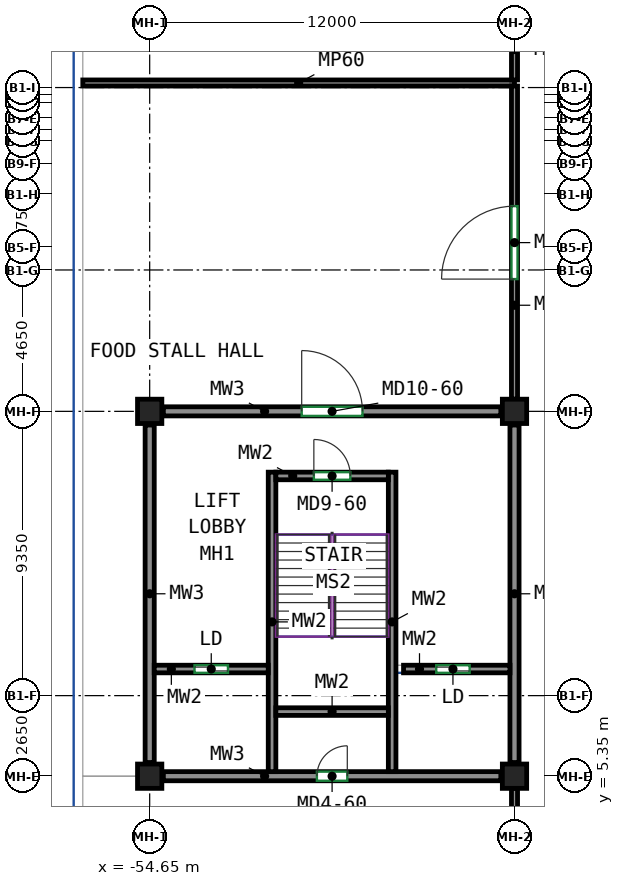
"""IFC4 building model, lengths in metres.
Left out: names, types, materials, properties, quantities, classifications, styles, units other than length and angle.
Written with IfcOpenShell. Run it as: python <this file> out.ifc"""

import sys

from ifc_helpers import new_model, si_unit, direction, frame, frame_2d, origin, origin_2d, place, context, subcontext, project, spatial, rectangle, extrude, source, transform, mapped, element, fill, save


model = new_model("IFC4")
c1 = context("Model", 3, precision=1e-05, world=origin(), true_north=direction((0.0, 1.0)))
c2 = subcontext(c1, "Body", "Model", "MODEL_VIEW")
j1 = project(units=[si_unit("LENGTHUNIT", "METRE"), si_unit("PLANEANGLEUNIT", "RADIAN")], contexts=[c1])
p1 = place(None, origin())
s1 = spatial("IfcSite", under=j1, at=p1, CompositionType="ELEMENT")
p2 = place(p1, origin())
s2 = spatial("IfcBuilding", under=s1, at=p2, CompositionType="ELEMENT")
p3 = place(p2, frame((0.0, 0.0, 9.0)))
s3 = spatial("IfcBuildingStorey", under=s2, at=p3, CompositionType="ELEMENT", Elevation=9.0)
m1 = source(origin(), c2, "Body", "SweptSolid", [
    extrude(rectangle(XDim=0.8, YDim=0.8, at=origin_2d()), origin(), (0.0, 0.0, 1.0), 4.1),
])
for number, where, z_axis, x_axis in (
    (1, (-54.65, 5.35, 0.0), (0.0, 0.0, 1.0), (1.0, 0.0, 0.0)),
    (2, (-54.65, 17.35, 0.0), (0.0, 0.0, 1.0), (1.0, 0.0, 0.0)),
    (3, (-42.65, 5.35, 0.0), (0.0, 0.0, 1.0), (1.0, 0.0, 0.0)),
    (4, (-42.65, 17.35, 0.0), (0.0, 0.0, 1.0), (1.0, 0.0, 0.0)),
):
    element("IfcColumn", number, at=place(p3, frame(where, z_axis=z_axis, x_axis=x_axis)), inside=s3, PredefinedType="COLUMN", context=c2, shape_type="MappedRepresentation", body=[
        mapped(m1, transform((0.0, 0.0, 0.0))),
    ])
m2 = source(origin(), c2, "Body", "SweptSolid", [
    extrude(rectangle(XDim=11.1, YDim=0.3, at=frame_2d((5.55, 0.0))), origin(), (0.0, 0.0, 1.0), 3.2),
])
p4 = place(p3, frame((-54.2, 5.35, 0.0), z_axis=(0.0, 0.0, 1.0), x_axis=(1.0, 0.0, 0.0)))
e5 = element("IfcWall", 5, at=p4, inside=s3, PredefinedType="SHEAR", context=c2, shape_type="MappedRepresentation", body=[
    mapped(m2, transform((0.0, 0.0, 0.0))),
])
p5 = place(p4, frame((5.05, 0.0, 0.0)))
e6 = element("IfcOpeningElement", 6, at=p5, cuts=e5, PredefinedType="OPENING", context=c2, shape_type="SweptSolid", body=[
    extrude(rectangle(XDim=1.0, YDim=2.1, at=frame_2d((0.5, 1.05))), frame((0.0, 0.16, 0.0), z_axis=(0.0, -1.0, 0.0), x_axis=(1.0, 0.0, 0.0)), (0.0, 0.0, 1.0), 0.32),
])
p6 = place(p3, frame((-54.2, 17.35, 0.0), z_axis=(0.0, 0.0, 1.0), x_axis=(1.0, 0.0, 0.0)))
e7 = element("IfcWall", 7, at=p6, inside=s3, PredefinedType="SHEAR", context=c2, shape_type="MappedRepresentation", body=[
    mapped(m2, transform((0.0, 0.0, 0.0))),
])
p7 = place(p6, frame((4.55, 0.0, 0.0)))
e8 = element("IfcOpeningElement", 8, at=p7, cuts=e7, PredefinedType="OPENING", context=c2, shape_type="SweptSolid", body=[
    extrude(rectangle(XDim=2.0, YDim=2.4, at=frame_2d((1.0, 1.2))), frame((0.0, 0.16, 0.0), z_axis=(0.0, -1.0, 0.0), x_axis=(1.0, 0.0, 0.0)), (0.0, 0.0, 1.0), 0.32),
])
for number, where, z_axis, x_axis in (
    (9, (-54.65, 5.8, 0.0), (0.0, 0.0, 1.0), (0.0, 1.0, 0.0)),
    (10, (-42.65, 5.8, 0.0), (0.0, 0.0, 1.0), (0.0, 1.0, 0.0)),
):
    element("IfcWall", number, at=place(p3, frame(where, z_axis=z_axis, x_axis=x_axis)), inside=s3, PredefinedType="SHEAR", context=c2, shape_type="MappedRepresentation", body=[
        mapped(m2, transform((0.0, 0.0, 0.0))),
    ])
m3 = source(origin(), c2, "Body", "SweptSolid", [
    extrude(rectangle(XDim=9.85, YDim=0.25, at=frame_2d((4.925, 0.0))), origin(), (0.0, 0.0, 1.0), 4.1),
])
for number, where, z_axis, x_axis in (
    (11, (-50.625, 5.5, 0.0), (0.0, 0.0, 1.0), (0.0, 1.0, 0.0)),
    (12, (-46.675, 5.5, 0.0), (0.0, 0.0, 1.0), (0.0, 1.0, 0.0)),
):
    element("IfcWall", number, at=place(p3, frame(where, z_axis=z_axis, x_axis=x_axis)), inside=s3, PredefinedType="SHEAR", context=c2, shape_type="MappedRepresentation", body=[
        mapped(m3, transform((0.0, 0.0, 0.0))),
    ])
m4 = source(origin(), c2, "Body", "SweptSolid", [
    extrude(rectangle(XDim=3.7, YDim=0.25, at=frame_2d((1.85, 0.0))), origin(), (0.0, 0.0, 1.0), 4.1),
])
p8 = place(p3, frame((-50.5, 7.475, 0.0), z_axis=(0.0, 0.0, 1.0), x_axis=(1.0, 0.0, 0.0)))
e13 = element("IfcWall", 13, at=p8, inside=s3, PredefinedType="SHEAR", context=c2, shape_type="MappedRepresentation", body=[
    mapped(m4, transform((0.0, 0.0, 0.0))),
])
p9 = place(p3, frame((-50.5, 15.225, 0.0), z_axis=(0.0, 0.0, 1.0), x_axis=(1.0, 0.0, 0.0)))
e14 = element("IfcWall", 14, at=p9, inside=s3, PredefinedType="SHEAR", context=c2, shape_type="MappedRepresentation", body=[
    mapped(m4, transform((0.0, 0.0, 0.0))),
])
p10 = place(p9, frame((1.25, 0.0, 0.0)))
e15 = element("IfcOpeningElement", 15, at=p10, cuts=e14, PredefinedType="OPENING", context=c2, shape_type="SweptSolid", body=[
    extrude(rectangle(XDim=1.2, YDim=2.1, at=frame_2d((0.6, 1.05))), frame((0.0, 0.135, 0.0), z_axis=(0.0, -1.0, 0.0), x_axis=(1.0, 0.0, 0.0)), (0.0, 0.0, 1.0), 0.27),
])
m5 = source(origin(), c2, "Body", "SweptSolid", [
    extrude(rectangle(XDim=3.75, YDim=0.25, at=frame_2d((1.875, 0.0))), origin(), (0.0, 0.0, 1.0), 4.1),
])
p11 = place(p3, frame((-54.5, 8.875, 0.0), z_axis=(0.0, 0.0, 1.0), x_axis=(1.0, 0.0, 0.0)))
e16 = element("IfcWall", 16, at=p11, inside=s3, PredefinedType="SHEAR", context=c2, shape_type="MappedRepresentation", body=[
    mapped(m5, transform((0.0, 0.0, 0.0))),
])
p12 = place(p11, frame((1.325, 0.0, 0.0)))
e17 = element("IfcOpeningElement", 17, at=p12, cuts=e16, PredefinedType="OPENING", context=c2, shape_type="SweptSolid", body=[
    extrude(rectangle(XDim=1.1, YDim=2.1, at=frame_2d((0.55, 1.05))), frame((0.0, 0.135, 0.0), z_axis=(0.0, -1.0, 0.0), x_axis=(1.0, 0.0, 0.0)), (0.0, 0.0, 1.0), 0.27),
])
m6 = source(origin(), c2, "Body", "SweptSolid", [
    extrude(rectangle(XDim=3.5, YDim=0.25, at=frame_2d((1.75, 0.0))), origin(), (0.0, 0.0, 1.0), 4.1),
])
p13 = place(p3, frame((-46.3, 8.875, 0.0), z_axis=(0.0, 0.0, 1.0), x_axis=(1.0, 0.0, 0.0)))
e18 = element("IfcWall", 18, at=p13, inside=s3, PredefinedType="SHEAR", context=c2, shape_type="MappedRepresentation", body=[
    mapped(m6, transform((0.0, 0.0, 0.0))),
])
p14 = place(p13, frame((1.075, 0.0, 0.0)))
e19 = element("IfcOpeningElement", 19, at=p14, cuts=e18, PredefinedType="OPENING", context=c2, shape_type="SweptSolid", body=[
    extrude(rectangle(XDim=1.1, YDim=2.1, at=frame_2d((0.55, 1.05))), frame((0.0, 0.135, 0.0), z_axis=(0.0, -1.0, 0.0), x_axis=(1.0, 0.0, 0.0)), (0.0, 0.0, 1.0), 0.27),
])
m7 = source(origin(), c2, "Body", "SweptSolid", [
    extrude(rectangle(XDim=100.7, YDim=0.3, at=frame_2d((50.35, 0.0))), origin(), (0.0, 0.0, 1.0), 4.1),
])
p15 = place(p3, frame((-57.0, -43.55, 0.0), z_axis=(0.0, 0.0, 1.0), x_axis=(0.0, 1.0, 0.0)))
e20 = element("IfcWall", 20, at=p15, inside=s3, PredefinedType="SOLIDWALL", context=c2, shape_type="MappedRepresentation", body=[
    mapped(m7, transform((0.0, 0.0, 0.0))),
])
p16 = place(p15, frame((3.15, 0.0, 0.9)))
e21 = element("IfcOpeningElement", 21, at=p16, cuts=e20, PredefinedType="OPENING", context=c2, shape_type="SweptSolid", body=[
    extrude(rectangle(XDim=2.4, YDim=1.8, at=frame_2d((1.2, 0.9))), frame((0.0, 0.16, 0.0), z_axis=(0.0, -1.0, 0.0), x_axis=(1.0, 0.0, 0.0)), (0.0, 0.0, 1.0), 0.32),
])
p17 = place(p15, frame((7.15, 0.0, 0.9)))
e22 = element("IfcOpeningElement", 22, at=p17, cuts=e20, PredefinedType="OPENING", context=c2, shape_type="SweptSolid", body=[
    extrude(rectangle(XDim=2.4, YDim=1.8, at=frame_2d((1.2, 0.9))), frame((0.0, 0.16, 0.0), z_axis=(0.0, -1.0, 0.0), x_axis=(1.0, 0.0, 0.0)), (0.0, 0.0, 1.0), 0.32),
])
p18 = place(p15, frame((11.15, 0.0, 0.9)))
e23 = element("IfcOpeningElement", 23, at=p18, cuts=e20, PredefinedType="OPENING", context=c2, shape_type="SweptSolid", body=[
    extrude(rectangle(XDim=2.4, YDim=1.8, at=frame_2d((1.2, 0.9))), frame((0.0, 0.16, 0.0), z_axis=(0.0, -1.0, 0.0), x_axis=(1.0, 0.0, 0.0)), (0.0, 0.0, 1.0), 0.32),
])
p19 = place(p15, frame((19.15, 0.0, 0.9)))
e24 = element("IfcOpeningElement", 24, at=p19, cuts=e20, PredefinedType="OPENING", context=c2, shape_type="SweptSolid", body=[
    extrude(rectangle(XDim=2.4, YDim=1.8, at=frame_2d((1.2, 0.9))), frame((0.0, 0.16, 0.0), z_axis=(0.0, -1.0, 0.0), x_axis=(1.0, 0.0, 0.0)), (0.0, 0.0, 1.0), 0.32),
])
p20 = place(p15, frame((23.15, 0.0, 0.9)))
e25 = element("IfcOpeningElement", 25, at=p20, cuts=e20, PredefinedType="OPENING", context=c2, shape_type="SweptSolid", body=[
    extrude(rectangle(XDim=2.4, YDim=1.8, at=frame_2d((1.2, 0.9))), frame((0.0, 0.16, 0.0), z_axis=(0.0, -1.0, 0.0), x_axis=(1.0, 0.0, 0.0)), (0.0, 0.0, 1.0), 0.32),
])
p21 = place(p15, frame((27.15, 0.0, 0.9)))
e26 = element("IfcOpeningElement", 26, at=p21, cuts=e20, PredefinedType="OPENING", context=c2, shape_type="SweptSolid", body=[
    extrude(rectangle(XDim=2.4, YDim=1.8, at=frame_2d((1.2, 0.9))), frame((0.0, 0.16, 0.0), z_axis=(0.0, -1.0, 0.0), x_axis=(1.0, 0.0, 0.0)), (0.0, 0.0, 1.0), 0.32),
])
p22 = place(p15, frame((31.15, 0.0, 0.9)))
e27 = element("IfcOpeningElement", 27, at=p22, cuts=e20, PredefinedType="OPENING", context=c2, shape_type="SweptSolid", body=[
    extrude(rectangle(XDim=2.4, YDim=1.8, at=frame_2d((1.2, 0.9))), frame((0.0, 0.16, 0.0), z_axis=(0.0, -1.0, 0.0), x_axis=(1.0, 0.0, 0.0)), (0.0, 0.0, 1.0), 0.32),
])
p23 = place(p15, frame((39.15, 0.0, 0.9)))
e28 = element("IfcOpeningElement", 28, at=p23, cuts=e20, PredefinedType="OPENING", context=c2, shape_type="SweptSolid", body=[
    extrude(rectangle(XDim=2.4, YDim=1.8, at=frame_2d((1.2, 0.9))), frame((0.0, 0.16, 0.0), z_axis=(0.0, -1.0, 0.0), x_axis=(1.0, 0.0, 0.0)), (0.0, 0.0, 1.0), 0.32),
])
p24 = place(p15, frame((43.15, 0.0, 0.9)))
e29 = element("IfcOpeningElement", 29, at=p24, cuts=e20, PredefinedType="OPENING", context=c2, shape_type="SweptSolid", body=[
    extrude(rectangle(XDim=2.4, YDim=1.8, at=frame_2d((1.2, 0.9))), frame((0.0, 0.16, 0.0), z_axis=(0.0, -1.0, 0.0), x_axis=(1.0, 0.0, 0.0)), (0.0, 0.0, 1.0), 0.32),
])
p25 = place(p15, frame((51.15, 0.0, 0.9)))
e30 = element("IfcOpeningElement", 30, at=p25, cuts=e20, PredefinedType="OPENING", context=c2, shape_type="SweptSolid", body=[
    extrude(rectangle(XDim=2.4, YDim=1.8, at=frame_2d((1.2, 0.9))), frame((0.0, 0.16, 0.0), z_axis=(0.0, -1.0, 0.0), x_axis=(1.0, 0.0, 0.0)), (0.0, 0.0, 1.0), 0.32),
])
p26 = place(p15, frame((55.15, 0.0, 0.9)))
e31 = element("IfcOpeningElement", 31, at=p26, cuts=e20, PredefinedType="OPENING", context=c2, shape_type="SweptSolid", body=[
    extrude(rectangle(XDim=2.4, YDim=1.8, at=frame_2d((1.2, 0.9))), frame((0.0, 0.16, 0.0), z_axis=(0.0, -1.0, 0.0), x_axis=(1.0, 0.0, 0.0)), (0.0, 0.0, 1.0), 0.32),
])
p27 = place(p15, frame((59.15, 0.0, 0.9)))
e32 = element("IfcOpeningElement", 32, at=p27, cuts=e20, PredefinedType="OPENING", context=c2, shape_type="SweptSolid", body=[
    extrude(rectangle(XDim=2.4, YDim=1.8, at=frame_2d((1.2, 0.9))), frame((0.0, 0.16, 0.0), z_axis=(0.0, -1.0, 0.0), x_axis=(1.0, 0.0, 0.0)), (0.0, 0.0, 1.0), 0.32),
])
p28 = place(p15, frame((63.15, 0.0, 0.9)))
e33 = element("IfcOpeningElement", 33, at=p28, cuts=e20, PredefinedType="OPENING", context=c2, shape_type="SweptSolid", body=[
    extrude(rectangle(XDim=2.4, YDim=1.8, at=frame_2d((1.2, 0.9))), frame((0.0, 0.16, 0.0), z_axis=(0.0, -1.0, 0.0), x_axis=(1.0, 0.0, 0.0)), (0.0, 0.0, 1.0), 0.32),
])
p29 = place(p15, frame((67.15, 0.0, 0.9)))
e34 = element("IfcOpeningElement", 34, at=p29, cuts=e20, PredefinedType="OPENING", context=c2, shape_type="SweptSolid", body=[
    extrude(rectangle(XDim=2.4, YDim=1.8, at=frame_2d((1.2, 0.9))), frame((0.0, 0.16, 0.0), z_axis=(0.0, -1.0, 0.0), x_axis=(1.0, 0.0, 0.0)), (0.0, 0.0, 1.0), 0.32),
])
p30 = place(p15, frame((75.15, 0.0, 0.9)))
e35 = element("IfcOpeningElement", 35, at=p30, cuts=e20, PredefinedType="OPENING", context=c2, shape_type="SweptSolid", body=[
    extrude(rectangle(XDim=2.4, YDim=1.8, at=frame_2d((1.2, 0.9))), frame((0.0, 0.16, 0.0), z_axis=(0.0, -1.0, 0.0), x_axis=(1.0, 0.0, 0.0)), (0.0, 0.0, 1.0), 0.32),
])
p31 = place(p15, frame((79.15, 0.0, 0.9)))
e36 = element("IfcOpeningElement", 36, at=p31, cuts=e20, PredefinedType="OPENING", context=c2, shape_type="SweptSolid", body=[
    extrude(rectangle(XDim=2.4, YDim=1.8, at=frame_2d((1.2, 0.9))), frame((0.0, 0.16, 0.0), z_axis=(0.0, -1.0, 0.0), x_axis=(1.0, 0.0, 0.0)), (0.0, 0.0, 1.0), 0.32),
])
p32 = place(p15, frame((83.15, 0.0, 0.9)))
e37 = element("IfcOpeningElement", 37, at=p32, cuts=e20, PredefinedType="OPENING", context=c2, shape_type="SweptSolid", body=[
    extrude(rectangle(XDim=2.4, YDim=1.8, at=frame_2d((1.2, 0.9))), frame((0.0, 0.16, 0.0), z_axis=(0.0, -1.0, 0.0), x_axis=(1.0, 0.0, 0.0)), (0.0, 0.0, 1.0), 0.32),
])
p33 = place(p15, frame((87.15, 0.0, 0.9)))
e38 = element("IfcOpeningElement", 38, at=p33, cuts=e20, PredefinedType="OPENING", context=c2, shape_type="SweptSolid", body=[
    extrude(rectangle(XDim=2.4, YDim=1.8, at=frame_2d((1.2, 0.9))), frame((0.0, 0.16, 0.0), z_axis=(0.0, -1.0, 0.0), x_axis=(1.0, 0.0, 0.0)), (0.0, 0.0, 1.0), 0.32),
])
p34 = place(p15, frame((91.15, 0.0, 0.9)))
e39 = element("IfcOpeningElement", 39, at=p34, cuts=e20, PredefinedType="OPENING", context=c2, shape_type="SweptSolid", body=[
    extrude(rectangle(XDim=2.4, YDim=1.8, at=frame_2d((1.2, 0.9))), frame((0.0, 0.16, 0.0), z_axis=(0.0, -1.0, 0.0), x_axis=(1.0, 0.0, 0.0)), (0.0, 0.0, 1.0), 0.32),
])
p35 = place(p15, frame((95.15, 0.0, 0.9)))
e40 = element("IfcOpeningElement", 40, at=p35, cuts=e20, PredefinedType="OPENING", context=c2, shape_type="SweptSolid", body=[
    extrude(rectangle(XDim=2.4, YDim=1.8, at=frame_2d((1.2, 0.9))), frame((0.0, 0.16, 0.0), z_axis=(0.0, -1.0, 0.0), x_axis=(1.0, 0.0, 0.0)), (0.0, 0.0, 1.0), 0.32),
])
m8 = source(origin(), c2, "Body", "SweptSolid", [
    extrude(rectangle(XDim=1.8, YDim=0.2, at=frame_2d((0.9, 0.0))), origin(), (0.0, 0.0, 1.0), 4.1),
])
p36 = place(p3, frame((-56.85, 5.35, 0.0), z_axis=(0.0, 0.0, 1.0), x_axis=(1.0, 0.0, 0.0)))
e41 = element("IfcWall", 41, at=p36, inside=s3, PredefinedType="PARTITIONING", context=c2, shape_type="MappedRepresentation", body=[
    mapped(m8, transform((0.0, 0.0, 0.0))),
])
m9 = source(origin(), c2, "Body", "SweptSolid", [
    extrude(rectangle(XDim=14.2, YDim=0.2, at=frame_2d((7.1, 0.0))), origin(), (0.0, 0.0, 1.0), 3.2),
])
p37 = place(p3, frame((-56.85, 28.15, 0.0), z_axis=(0.0, 0.0, 1.0), x_axis=(1.0, 0.0, 0.0)))
e42 = element("IfcWall", 42, at=p37, inside=s3, PredefinedType="PARTITIONING", context=c2, shape_type="MappedRepresentation", body=[
    mapped(m9, transform((0.0, 0.0, 0.0))),
])
m10 = source(origin(), c2, "Body", "SweptSolid", [
    extrude(rectangle(XDim=11.2, YDim=0.2, at=frame_2d((5.6, 0.0))), origin(), (0.0, 0.0, 1.0), 3.2),
])
p38 = place(p3, frame((-42.65, -6.25, 0.0), z_axis=(0.0, 0.0, 1.0), x_axis=(0.0, 1.0, 0.0)))
e43 = element("IfcWall", 43, at=p38, inside=s3, PredefinedType="PARTITIONING", context=c2, shape_type="MappedRepresentation", body=[
    mapped(m10, transform((0.0, 0.0, 0.0))),
])
p39 = place(p38, frame((5.0, 0.0, 0.0)))
e44 = element("IfcOpeningElement", 44, at=p39, cuts=e43, PredefinedType="OPENING", context=c2, shape_type="SweptSolid", body=[
    extrude(rectangle(XDim=1.2, YDim=2.1, at=frame_2d((0.6, 1.05))), frame((0.0, 0.11, 0.0), z_axis=(0.0, -1.0, 0.0), x_axis=(1.0, 0.0, 0.0)), (0.0, 0.0, 1.0), 0.22),
])
m11 = source(origin(), c2, "Body", "SweptSolid", [
    extrude(rectangle(XDim=10.3, YDim=0.2, at=frame_2d((5.15, 0.0))), origin(), (0.0, 0.0, 1.0), 3.2),
])
p40 = place(p3, frame((-42.65, 17.75, 0.0), z_axis=(0.0, 0.0, 1.0), x_axis=(0.0, 1.0, 0.0)))
e45 = element("IfcWall", 45, at=p40, inside=s3, PredefinedType="PARTITIONING", context=c2, shape_type="MappedRepresentation", body=[
    mapped(m11, transform((0.0, 0.0, 0.0))),
])
p41 = place(p40, frame((3.95, 0.0, 0.0)))
e46 = element("IfcOpeningElement", 46, at=p41, cuts=e45, PredefinedType="OPENING", context=c2, shape_type="SweptSolid", body=[
    extrude(rectangle(XDim=2.4, YDim=2.4, at=frame_2d((1.2, 1.2))), frame((0.0, 0.11, 0.0), z_axis=(0.0, -1.0, 0.0), x_axis=(1.0, 0.0, 0.0)), (0.0, 0.0, 1.0), 0.22),
])
m12 = source(origin(), c2, "Body", "SweptSolid", [
    extrude(rectangle(XDim=2.0, YDim=0.2, at=frame_2d((1.0, 0.0))), origin(), (0.0, 0.0, 1.0), 3.2),
])
p42 = place(p3, frame((-42.65, 28.25, 0.0), z_axis=(0.0, 0.0, 1.0), x_axis=(0.0, 1.0, 0.0)))
e47 = element("IfcWall", 47, at=p42, inside=s3, PredefinedType="PARTITIONING", context=c2, shape_type="MappedRepresentation", body=[
    mapped(m12, transform((0.0, 0.0, 0.0))),
])
p43 = place(p25, origin())
e48 = element("IfcWindow", 48, at=p43, inside=s3, PartitioningType="SINGLE_PANEL", PredefinedType="WINDOW", context=c2, shape_type="SweptSolid", body=[
    extrude(rectangle(XDim=2.4, YDim=1.8, at=frame_2d((1.2, 0.9))), frame((0.0, 0.03, 0.0), z_axis=(0.0, -1.0, 0.0), x_axis=(1.0, 0.0, 0.0)), (0.0, 0.0, 1.0), 0.06),
])
fill(e30, e48)
p44 = place(p26, origin())
e49 = element("IfcWindow", 49, at=p44, inside=s3, PartitioningType="SINGLE_PANEL", PredefinedType="WINDOW", context=c2, shape_type="SweptSolid", body=[
    extrude(rectangle(XDim=2.4, YDim=1.8, at=frame_2d((1.2, 0.9))), frame((0.0, 0.03, 0.0), z_axis=(0.0, -1.0, 0.0), x_axis=(1.0, 0.0, 0.0)), (0.0, 0.0, 1.0), 0.06),
])
fill(e31, e49)
p45 = place(p27, origin())
e50 = element("IfcWindow", 50, at=p45, inside=s3, PartitioningType="SINGLE_PANEL", PredefinedType="WINDOW", context=c2, shape_type="SweptSolid", body=[
    extrude(rectangle(XDim=2.4, YDim=1.8, at=frame_2d((1.2, 0.9))), frame((0.0, 0.03, 0.0), z_axis=(0.0, -1.0, 0.0), x_axis=(1.0, 0.0, 0.0)), (0.0, 0.0, 1.0), 0.06),
])
fill(e32, e50)
p46 = place(p28, origin())
e51 = element("IfcWindow", 51, at=p46, inside=s3, PartitioningType="SINGLE_PANEL", PredefinedType="WINDOW", context=c2, shape_type="SweptSolid", body=[
    extrude(rectangle(XDim=2.4, YDim=1.8, at=frame_2d((1.2, 0.9))), frame((0.0, 0.03, 0.0), z_axis=(0.0, -1.0, 0.0), x_axis=(1.0, 0.0, 0.0)), (0.0, 0.0, 1.0), 0.06),
])
fill(e33, e51)
p47 = place(p29, origin())
e52 = element("IfcWindow", 52, at=p47, inside=s3, PartitioningType="SINGLE_PANEL", PredefinedType="WINDOW", context=c2, shape_type="SweptSolid", body=[
    extrude(rectangle(XDim=2.4, YDim=1.8, at=frame_2d((1.2, 0.9))), frame((0.0, 0.03, 0.0), z_axis=(0.0, -1.0, 0.0), x_axis=(1.0, 0.0, 0.0)), (0.0, 0.0, 1.0), 0.06),
])
fill(e34, e52)
p48 = place(p10, origin())
e53 = element("IfcDoor", 53, at=p48, inside=s3, OperationType="DOUBLE_DOOR_SINGLE_SWING", PredefinedType="DOOR", context=c2, shape_type="SweptSolid", body=[
    extrude(rectangle(XDim=1.2, YDim=2.1, at=frame_2d((0.6, 1.05))), frame((0.0, 0.025, 0.0), z_axis=(0.0, -1.0, 0.0), x_axis=(1.0, 0.0, 0.0)), (0.0, 0.0, 1.0), 0.05),
])
fill(e15, e53)
p49 = place(p7, origin())
e54 = element("IfcDoor", 54, at=p49, inside=s3, OperationType="DOUBLE_DOOR_SINGLE_SWING", PredefinedType="DOOR", context=c2, shape_type="SweptSolid", body=[
    extrude(rectangle(XDim=2.0, YDim=2.4, at=frame_2d((1.0, 1.2))), frame((0.0, 0.025, 0.0), z_axis=(0.0, -1.0, 0.0), x_axis=(1.0, 0.0, 0.0)), (0.0, 0.0, 1.0), 0.05),
])
fill(e8, e54)
p50 = place(p12, origin())
e55 = element("IfcDoor", 55, at=p50, inside=s3, OperationType="SLIDING_TO_LEFT", PredefinedType="DOOR", context=c2, shape_type="SweptSolid", body=[
    extrude(rectangle(XDim=1.1, YDim=2.1, at=frame_2d((0.55, 1.05))), frame((0.0, 0.025, 0.0), z_axis=(0.0, -1.0, 0.0), x_axis=(1.0, 0.0, 0.0)), (0.0, 0.0, 1.0), 0.05),
])
fill(e17, e55)
p51 = place(p14, origin())
e56 = element("IfcDoor", 56, at=p51, inside=s3, OperationType="SLIDING_TO_LEFT", PredefinedType="DOOR", context=c2, shape_type="SweptSolid", body=[
    extrude(rectangle(XDim=1.1, YDim=2.1, at=frame_2d((0.55, 1.05))), frame((0.0, 0.025, 0.0), z_axis=(0.0, -1.0, 0.0), x_axis=(1.0, 0.0, 0.0)), (0.0, 0.0, 1.0), 0.05),
])
fill(e19, e56)
p52 = place(p5, origin())
e57 = element("IfcDoor", 57, at=p52, inside=s3, OperationType="SINGLE_SWING_RIGHT", PredefinedType="DOOR", context=c2, shape_type="SweptSolid", body=[
    extrude(rectangle(XDim=1.0, YDim=2.1, at=frame_2d((0.5, 1.05))), frame((0.0, 0.025, 0.0), z_axis=(0.0, -1.0, 0.0), x_axis=(1.0, 0.0, 0.0)), (0.0, 0.0, 1.0), 0.05),
])
fill(e6, e57)
p53 = place(p41, origin())
e58 = element("IfcDoor", 58, at=p53, inside=s3, OperationType="DOUBLE_DOOR_SINGLE_SWING", PredefinedType="DOOR", context=c2, shape_type="SweptSolid", body=[
    extrude(rectangle(XDim=2.4, YDim=2.4, at=frame_2d((1.2, 1.2))), frame((0.0, 0.025, 0.0), z_axis=(0.0, -1.0, 0.0), x_axis=(1.0, 0.0, 0.0)), (0.0, 0.0, 1.0), 0.05),
])
fill(e46, e58)
save(model, sys.argv[1])
